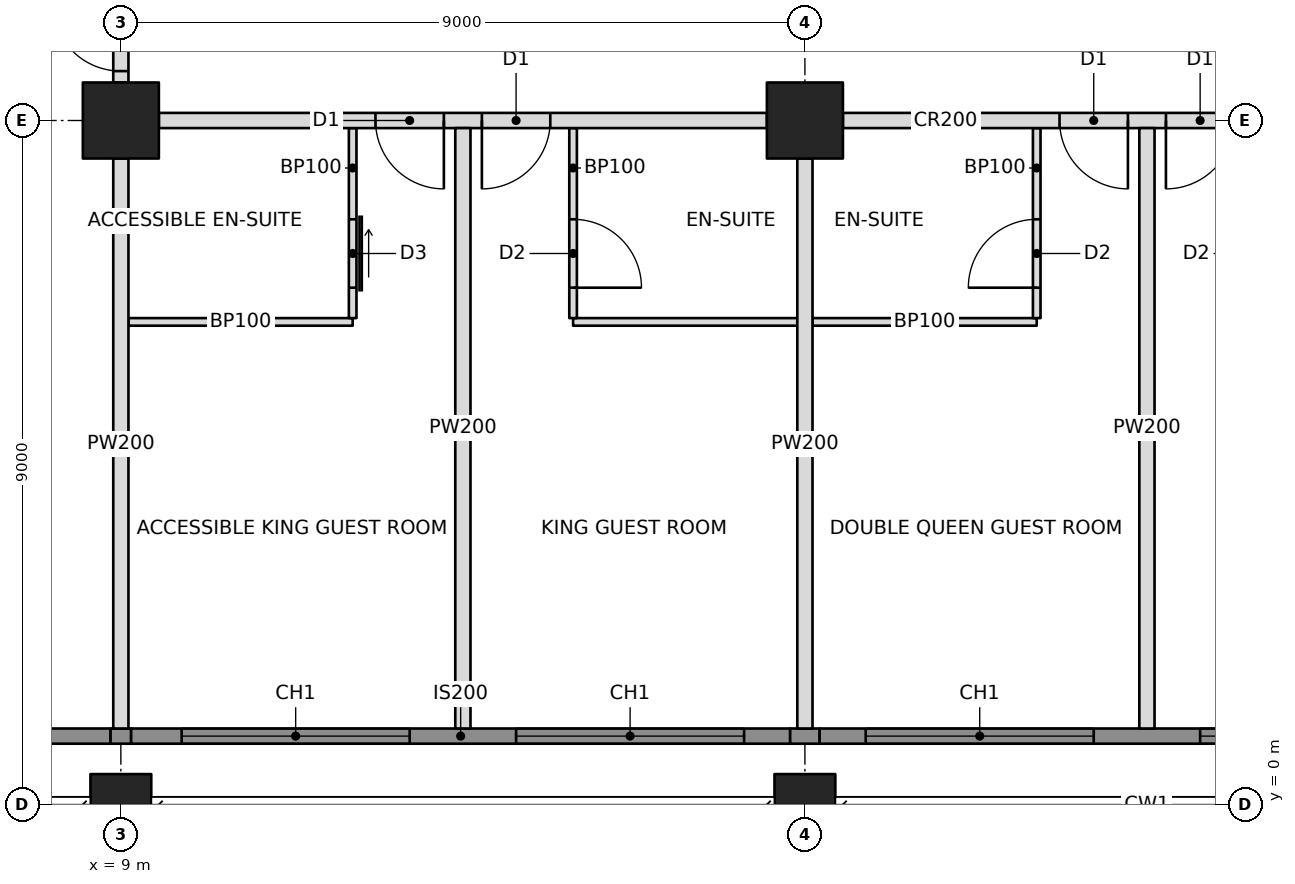
"""IFC4 building model, lengths in metres.
Left out: names, types, materials, properties, quantities, classifications, styles, units other than length and angle.
Written with IfcOpenShell. Run it as: python <this file> out.ifc"""

import sys

from ifc_helpers import new_model, si_unit, direction, frame, frame_2d, origin, origin_2d, place, context, subcontext, project, spatial, rectangle, hollow_rectangle, extrude, element, fill, save


model = new_model("IFC4")
c1 = context("Model", 3, precision=1e-05, world=origin(), true_north=direction((0.0, 1.0)))
c2 = subcontext(c1, "Body", "Model", "MODEL_VIEW")
j1 = project(units=[si_unit("LENGTHUNIT", "METRE"), si_unit("PLANEANGLEUNIT", "RADIAN")], contexts=[c1])
p1 = place(None, origin())
s1 = spatial("IfcSite", under=j1, at=p1, CompositionType="ELEMENT")
p2 = place(p1, origin())
s2 = spatial("IfcBuilding", under=s1, at=p2, CompositionType="ELEMENT")
p3 = place(p2, frame((0.0, 0.0, 163.8)))
s3 = spatial("IfcBuildingStorey", under=s2, at=p3, CompositionType="ELEMENT", Elevation=163.8)
p4 = place(p3, frame((9.0, 0.0, 0.0), z_axis=(0.0, 0.0, 1.0), x_axis=(1.0, 0.0, 0.0)))
e1 = element("IfcColumn", 1, at=p4, inside=s3, PredefinedType="COLUMN", context=c2, shape_type="SweptSolid", body=[
    extrude(hollow_rectangle(XDim=0.8, YDim=0.8, WallThickness=0.07, at=origin_2d()), origin(), (0.0, 0.0, 1.0), 3.4),
])
p5 = place(p3, frame((9.0, 9.0, 0.0), z_axis=(0.0, 0.0, 1.0), x_axis=(1.0, 0.0, 0.0)))
e2 = element("IfcColumn", 2, at=p5, inside=s3, PredefinedType="COLUMN", context=c2, shape_type="SweptSolid", body=[
    extrude(hollow_rectangle(XDim=1.0, YDim=1.0, WallThickness=0.1, at=origin_2d()), origin(), (0.0, 0.0, 1.0), 3.4),
])
p6 = place(p3, frame((18.0, 0.0, 0.0), z_axis=(0.0, 0.0, 1.0), x_axis=(1.0, 0.0, 0.0)))
e3 = element("IfcColumn", 3, at=p6, inside=s3, PredefinedType="COLUMN", context=c2, shape_type="SweptSolid", body=[
    extrude(hollow_rectangle(XDim=0.8, YDim=0.8, WallThickness=0.07, at=origin_2d()), origin(), (0.0, 0.0, 1.0), 3.4),
])
p7 = place(p3, frame((18.0, 9.0, 0.0), z_axis=(0.0, 0.0, 1.0), x_axis=(1.0, 0.0, 0.0)))
e4 = element("IfcColumn", 4, at=p7, inside=s3, PredefinedType="COLUMN", context=c2, shape_type="SweptSolid", body=[
    extrude(hollow_rectangle(XDim=1.0, YDim=1.0, WallThickness=0.1, at=origin_2d()), origin(), (0.0, 0.0, 1.0), 3.4),
])
p8 = place(p3, frame((3.0, 0.9, 0.0), z_axis=(0.0, 0.0, 1.0), x_axis=(1.0, 0.0, 0.0)))
e5 = element("IfcWall", 5, at=p8, inside=s3, PredefinedType="SOLIDWALL", context=c2, shape_type="SweptSolid", body=[
    extrude(rectangle(XDim=5.865, YDim=0.2, at=frame_2d((2.932, 0.0))), origin(), (0.0, 0.0, 1.0), 3.2),
])
p9 = place(p8, frame((1.45, 0.0, 0.6)))
e6 = element("IfcOpeningElement", 6, at=p9, cuts=e5, PredefinedType="OPENING", context=c2, shape_type="SweptSolid", body=[
    extrude(rectangle(XDim=3.0, YDim=2.2, at=frame_2d((1.5, 1.1))), frame((0.0, 0.11, 0.0), z_axis=(0.0, -1.0, 0.0), x_axis=(1.0, 0.0, 0.0)), (0.0, 0.0, 1.0), 0.22),
])
p10 = place(p3, frame((9.5, 9.0, 0.0), z_axis=(0.0, 0.0, 1.0), x_axis=(1.0, 0.0, 0.0)))
e7 = element("IfcWall", 7, at=p10, inside=s3, PredefinedType="PARTITIONING", context=c2, shape_type="SweptSolid", body=[
    extrude(rectangle(XDim=8.0, YDim=0.2, at=frame_2d((4.0, 0.0))), origin(), (0.0, 0.0, 1.0), 2.405),
])
p11 = place(p10, frame((2.85, 0.0, 0.0)))
e8 = element("IfcOpeningElement", 8, at=p11, cuts=e7, PredefinedType="OPENING", context=c2, shape_type="SweptSolid", body=[
    extrude(rectangle(XDim=0.9, YDim=2.1, at=frame_2d((0.45, 1.05))), frame((0.0, 0.11, 0.0), z_axis=(0.0, -1.0, 0.0), x_axis=(1.0, 0.0, 0.0)), (0.0, 0.0, 1.0), 0.22),
])
p12 = place(p10, frame((4.25, 0.0, 0.0)))
e9 = element("IfcOpeningElement", 9, at=p12, cuts=e7, PredefinedType="OPENING", context=c2, shape_type="SweptSolid", body=[
    extrude(rectangle(XDim=0.9, YDim=2.1, at=frame_2d((0.45, 1.05))), frame((0.0, 0.11, 0.0), z_axis=(0.0, -1.0, 0.0), x_axis=(1.0, 0.0, 0.0)), (0.0, 0.0, 1.0), 0.22),
])
p13 = place(p3, frame((18.5, 9.0, 0.0), z_axis=(0.0, 0.0, 1.0), x_axis=(1.0, 0.0, 0.0)))
e10 = element("IfcWall", 10, at=p13, inside=s3, PredefinedType="PARTITIONING", context=c2, shape_type="SweptSolid", body=[
    extrude(rectangle(XDim=8.0, YDim=0.2, at=frame_2d((4.0, 0.0))), origin(), (0.0, 0.0, 1.0), 2.405),
])
p14 = place(p13, frame((2.85, 0.0, 0.0)))
e11 = element("IfcOpeningElement", 11, at=p14, cuts=e10, PredefinedType="OPENING", context=c2, shape_type="SweptSolid", body=[
    extrude(rectangle(XDim=0.9, YDim=2.1, at=frame_2d((0.45, 1.05))), frame((0.0, 0.11, 0.0), z_axis=(0.0, -1.0, 0.0), x_axis=(1.0, 0.0, 0.0)), (0.0, 0.0, 1.0), 0.22),
])
p15 = place(p13, frame((4.25, 0.0, 0.0)))
e12 = element("IfcOpeningElement", 12, at=p15, cuts=e10, PredefinedType="OPENING", context=c2, shape_type="SweptSolid", body=[
    extrude(rectangle(XDim=0.9, YDim=2.1, at=frame_2d((0.45, 1.05))), frame((0.0, 0.11, 0.0), z_axis=(0.0, -1.0, 0.0), x_axis=(1.0, 0.0, 0.0)), (0.0, 0.0, 1.0), 0.22),
])
p16 = place(p3, frame((9.0, 8.5, 0.0), z_axis=(0.0, 0.0, 1.0), x_axis=(0.0, -1.0, 0.0)))
e13 = element("IfcWall", 13, at=p16, inside=s3, PredefinedType="PARTITIONING", context=c2, shape_type="SweptSolid", body=[
    extrude(rectangle(XDim=7.5, YDim=0.2, at=frame_2d((3.75, 0.0))), origin(), (0.0, 0.0, 1.0), 2.438),
])
p17 = place(p3, frame((13.5, 8.9, 0.0), z_axis=(0.0, 0.0, 1.0), x_axis=(0.0, -1.0, 0.0)))
e14 = element("IfcWall", 14, at=p17, inside=s3, PredefinedType="PARTITIONING", context=c2, shape_type="SweptSolid", body=[
    extrude(rectangle(XDim=7.9, YDim=0.2, at=frame_2d((3.95, 0.0))), origin(), (0.0, 0.0, 1.0), 2.404),
])
p18 = place(p3, frame((18.0, 8.5, 0.0), z_axis=(0.0, 0.0, 1.0), x_axis=(0.0, -1.0, 0.0)))
e15 = element("IfcWall", 15, at=p18, inside=s3, PredefinedType="PARTITIONING", context=c2, shape_type="SweptSolid", body=[
    extrude(rectangle(XDim=7.5, YDim=0.2, at=frame_2d((3.75, 0.0))), origin(), (0.0, 0.0, 1.0), 2.405),
])
p19 = place(p3, frame((22.5, 8.9, 0.0), z_axis=(0.0, 0.0, 1.0), x_axis=(0.0, -1.0, 0.0)))
e16 = element("IfcWall", 16, at=p19, inside=s3, PredefinedType="PARTITIONING", context=c2, shape_type="SweptSolid", body=[
    extrude(rectangle(XDim=7.9, YDim=0.2, at=frame_2d((3.95, 0.0))), origin(), (0.0, 0.0, 1.0), 2.404),
])
p20 = place(p3, frame((9.1, 6.35, 0.0), z_axis=(0.0, 0.0, 1.0), x_axis=(1.0, 0.0, 0.0)))
e17 = element("IfcWall", 17, at=p20, inside=s3, PredefinedType="PARTITIONING", context=c2, shape_type="SweptSolid", body=[
    extrude(rectangle(XDim=2.95, YDim=0.1, at=frame_2d((1.475, 0.0))), origin(), (0.0, 0.0, 1.0), 2.438),
])
p21 = place(p3, frame((12.05, 8.9, 0.0), z_axis=(0.0, 0.0, 1.0), x_axis=(0.0, -1.0, 0.0)))
e18 = element("IfcWall", 18, at=p21, inside=s3, PredefinedType="PARTITIONING", context=c2, shape_type="SweptSolid", body=[
    extrude(rectangle(XDim=2.5, YDim=0.1, at=frame_2d((1.25, 0.0))), origin(), (0.0, 0.0, 1.0), 2.404),
])
p22 = place(p21, frame((1.2, 0.0, 0.0)))
e19 = element("IfcOpeningElement", 19, at=p22, cuts=e18, PredefinedType="OPENING", context=c2, shape_type="SweptSolid", body=[
    extrude(rectangle(XDim=0.9, YDim=2.1, at=frame_2d((0.45, 1.05))), frame((0.0, 0.06, 0.0), z_axis=(0.0, -1.0, 0.0), x_axis=(1.0, 0.0, 0.0)), (0.0, 0.0, 1.0), 0.12),
])
p23 = place(p3, frame((14.95, 6.35, 0.0), z_axis=(0.0, 0.0, 1.0), x_axis=(1.0, 0.0, 0.0)))
e20 = element("IfcWall", 20, at=p23, inside=s3, PredefinedType="PARTITIONING", context=c2, shape_type="SweptSolid", body=[
    extrude(rectangle(XDim=2.95, YDim=0.1, at=frame_2d((1.475, 0.0))), origin(), (0.0, 0.0, 1.0), 2.404),
])
p24 = place(p3, frame((14.95, 8.9, 0.0), z_axis=(0.0, 0.0, 1.0), x_axis=(0.0, -1.0, 0.0)))
e21 = element("IfcWall", 21, at=p24, inside=s3, PredefinedType="PARTITIONING", context=c2, shape_type="SweptSolid", body=[
    extrude(rectangle(XDim=2.5, YDim=0.1, at=frame_2d((1.25, 0.0))), origin(), (0.0, 0.0, 1.0), 2.404),
])
p25 = place(p24, frame((1.2, 0.0, 0.0)))
e22 = element("IfcOpeningElement", 22, at=p25, cuts=e21, PredefinedType="OPENING", context=c2, shape_type="SweptSolid", body=[
    extrude(rectangle(XDim=0.9, YDim=2.1, at=frame_2d((0.45, 1.05))), frame((0.0, 0.06, 0.0), z_axis=(0.0, -1.0, 0.0), x_axis=(1.0, 0.0, 0.0)), (0.0, 0.0, 1.0), 0.12),
])
p26 = place(p3, frame((18.1, 6.35, 0.0), z_axis=(0.0, 0.0, 1.0), x_axis=(1.0, 0.0, 0.0)))
e23 = element("IfcWall", 23, at=p26, inside=s3, PredefinedType="PARTITIONING", context=c2, shape_type="SweptSolid", body=[
    extrude(rectangle(XDim=2.95, YDim=0.1, at=frame_2d((1.475, 0.0))), origin(), (0.0, 0.0, 1.0), 2.404),
])
p27 = place(p3, frame((21.05, 8.9, 0.0), z_axis=(0.0, 0.0, 1.0), x_axis=(0.0, -1.0, 0.0)))
e24 = element("IfcWall", 24, at=p27, inside=s3, PredefinedType="PARTITIONING", context=c2, shape_type="SweptSolid", body=[
    extrude(rectangle(XDim=2.5, YDim=0.1, at=frame_2d((1.25, 0.0))), origin(), (0.0, 0.0, 1.0), 2.404),
])
p28 = place(p27, frame((1.2, 0.0, 0.0)))
e25 = element("IfcOpeningElement", 25, at=p28, cuts=e24, PredefinedType="OPENING", context=c2, shape_type="SweptSolid", body=[
    extrude(rectangle(XDim=0.9, YDim=2.1, at=frame_2d((0.45, 1.05))), frame((0.0, 0.06, 0.0), z_axis=(0.0, -1.0, 0.0), x_axis=(1.0, 0.0, 0.0)), (0.0, 0.0, 1.0), 0.12),
])
p29 = place(p3, frame((9.0, 9.5, 0.0), z_axis=(0.0, 0.0, 1.0), x_axis=(0.0, 1.0, 0.0)))
e26 = element("IfcWall", 26, at=p29, inside=s3, PredefinedType="PARTITIONING", context=c2, shape_type="SweptSolid", body=[
    extrude(rectangle(XDim=1.2, YDim=0.2, at=frame_2d((0.6, 0.0))), origin(), (0.0, 0.0, 1.0), 2.405),
])
p30 = place(p29, frame((0.15, 0.0, 0.0)))
e27 = element("IfcOpeningElement", 27, at=p30, cuts=e26, PredefinedType="OPENING", context=c2, shape_type="SweptSolid", body=[
    extrude(rectangle(XDim=0.9, YDim=2.1, at=frame_2d((0.45, 1.05))), frame((0.0, 0.11, 0.0), z_axis=(0.0, -1.0, 0.0), x_axis=(1.0, 0.0, 0.0)), (0.0, 0.0, 1.0), 0.22),
])
p31 = place(p3, frame((8.865, 0.9, 0.0), z_axis=(0.0, 0.0, 1.0), x_axis=(1.0, 0.0, 0.0)))
e28 = element("IfcWall", 28, at=p31, inside=s3, PredefinedType="SOLIDWALL", context=c2, shape_type="SweptSolid", body=[
    extrude(rectangle(XDim=0.271, YDim=0.2, at=frame_2d((0.135, 0.0))), origin(), (0.0, 0.0, 1.0), 2.438),
])
p32 = place(p3, frame((9.135, 0.9, 0.0), z_axis=(0.0, 0.0, 1.0), x_axis=(1.0, 0.0, 0.0)))
e29 = element("IfcWall", 29, at=p32, inside=s3, PredefinedType="SOLIDWALL", context=c2, shape_type="SweptSolid", body=[
    extrude(rectangle(XDim=8.671, YDim=0.2, at=frame_2d((4.335, 0.0))), origin(), (0.0, 0.0, 1.0), 3.2),
])
p33 = place(p32, frame((0.665, 0.0, 0.6)))
e30 = element("IfcOpeningElement", 30, at=p33, cuts=e29, PredefinedType="OPENING", context=c2, shape_type="SweptSolid", body=[
    extrude(rectangle(XDim=3.0, YDim=2.2, at=frame_2d((1.5, 1.1))), frame((0.0, 0.11, 0.0), z_axis=(0.0, -1.0, 0.0), x_axis=(1.0, 0.0, 0.0)), (0.0, 0.0, 1.0), 0.22),
])
p34 = place(p32, frame((5.065, 0.0, 0.6)))
e31 = element("IfcOpeningElement", 31, at=p34, cuts=e29, PredefinedType="OPENING", context=c2, shape_type="SweptSolid", body=[
    extrude(rectangle(XDim=3.0, YDim=2.2, at=frame_2d((1.5, 1.1))), frame((0.0, 0.11, 0.0), z_axis=(0.0, -1.0, 0.0), x_axis=(1.0, 0.0, 0.0)), (0.0, 0.0, 1.0), 0.22),
])
p35 = place(p3, frame((17.806, 0.9, 0.0), z_axis=(0.0, 0.0, 1.0), x_axis=(1.0, 0.0, 0.0)))
e32 = element("IfcWall", 32, at=p35, inside=s3, PredefinedType="SOLIDWALL", context=c2, shape_type="SweptSolid", body=[
    extrude(rectangle(XDim=0.388, YDim=0.2, at=frame_2d((0.194, 0.0))), origin(), (0.0, 0.0, 1.0), 2.404),
])
p36 = place(p3, frame((18.194, 0.9, 0.0), z_axis=(0.0, 0.0, 1.0), x_axis=(1.0, 0.0, 0.0)))
e33 = element("IfcWall", 33, at=p36, inside=s3, PredefinedType="SOLIDWALL", context=c2, shape_type="SweptSolid", body=[
    extrude(rectangle(XDim=8.612, YDim=0.2, at=frame_2d((4.306, 0.0))), origin(), (0.0, 0.0, 1.0), 3.2),
])
p37 = place(p36, frame((0.606, 0.0, 0.6)))
e34 = element("IfcOpeningElement", 34, at=p37, cuts=e33, PredefinedType="OPENING", context=c2, shape_type="SweptSolid", body=[
    extrude(rectangle(XDim=3.0, YDim=2.2, at=frame_2d((1.5, 1.1))), frame((0.0, 0.11, 0.0), z_axis=(0.0, -1.0, 0.0), x_axis=(1.0, 0.0, 0.0)), (0.0, 0.0, 1.0), 0.22),
])
p38 = place(p36, frame((5.006, 0.0, 0.6)))
e35 = element("IfcOpeningElement", 35, at=p38, cuts=e33, PredefinedType="OPENING", context=c2, shape_type="SweptSolid", body=[
    extrude(rectangle(XDim=3.0, YDim=2.2, at=frame_2d((1.5, 1.1))), frame((0.0, 0.11, 0.0), z_axis=(0.0, -1.0, 0.0), x_axis=(1.0, 0.0, 0.0)), (0.0, 0.0, 1.0), 0.22),
])
p39 = place(p33, origin())
e36 = element("IfcWindow", 36, at=p39, inside=s3, PartitioningType="TRIPLE_PANEL_VERTICAL", PredefinedType="WINDOW", context=c2, shape_type="SweptSolid", body=[
    extrude(rectangle(XDim=3.0, YDim=2.2, at=frame_2d((1.5, 1.1))), frame((0.0, 0.03, 0.0), z_axis=(0.0, -1.0, 0.0), x_axis=(1.0, 0.0, 0.0)), (0.0, 0.0, 1.0), 0.06),
])
fill(e30, e36)
p40 = place(p34, origin())
e37 = element("IfcWindow", 37, at=p40, inside=s3, PartitioningType="TRIPLE_PANEL_VERTICAL", PredefinedType="WINDOW", context=c2, shape_type="SweptSolid", body=[
    extrude(rectangle(XDim=3.0, YDim=2.2, at=frame_2d((1.5, 1.1))), frame((0.0, 0.03, 0.0), z_axis=(0.0, -1.0, 0.0), x_axis=(1.0, 0.0, 0.0)), (0.0, 0.0, 1.0), 0.06),
])
fill(e31, e37)
p41 = place(p37, origin())
e38 = element("IfcWindow", 38, at=p41, inside=s3, PartitioningType="TRIPLE_PANEL_VERTICAL", PredefinedType="WINDOW", context=c2, shape_type="SweptSolid", body=[
    extrude(rectangle(XDim=3.0, YDim=2.2, at=frame_2d((1.5, 1.1))), frame((0.0, 0.03, 0.0), z_axis=(0.0, -1.0, 0.0), x_axis=(1.0, 0.0, 0.0)), (0.0, 0.0, 1.0), 0.06),
])
fill(e34, e38)
p42 = place(p38, origin())
e39 = element("IfcWindow", 39, at=p42, inside=s3, PartitioningType="TRIPLE_PANEL_VERTICAL", PredefinedType="WINDOW", context=c2, shape_type="SweptSolid", body=[
    extrude(rectangle(XDim=3.0, YDim=2.2, at=frame_2d((1.5, 1.1))), frame((0.0, 0.03, 0.0), z_axis=(0.0, -1.0, 0.0), x_axis=(1.0, 0.0, 0.0)), (0.0, 0.0, 1.0), 0.06),
])
fill(e35, e39)
p43 = place(p22, origin())
e40 = element("IfcDoor", 40, at=p43, inside=s3, OperationType="SLIDING_TO_LEFT", PredefinedType="DOOR", context=c2, shape_type="SweptSolid", body=[
    extrude(rectangle(XDim=0.9, YDim=2.1, at=frame_2d((0.45, 1.05))), frame((0.0, 0.025, 0.0), z_axis=(0.0, -1.0, 0.0), x_axis=(1.0, 0.0, 0.0)), (0.0, 0.0, 1.0), 0.05),
])
fill(e19, e40)
p44 = place(p11, frame((0.9, 0.0, 0.0), z_axis=(0.0, 0.0, 1.0), x_axis=(-1.0, 0.0, 0.0)))
e41 = element("IfcDoor", 41, at=p44, inside=s3, OperationType="SINGLE_SWING_LEFT", PredefinedType="DOOR", context=c2, shape_type="SweptSolid", body=[
    extrude(rectangle(XDim=0.9, YDim=2.1, at=frame_2d((0.45, 1.05))), frame((0.0, 0.025, 0.0), z_axis=(0.0, -1.0, 0.0), x_axis=(1.0, 0.0, 0.0)), (0.0, 0.0, 1.0), 0.05),
])
fill(e8, e41)
p45 = place(p25, origin())
e42 = element("IfcDoor", 42, at=p45, inside=s3, OperationType="SINGLE_SWING_RIGHT", PredefinedType="DOOR", context=c2, shape_type="SweptSolid", body=[
    extrude(rectangle(XDim=0.9, YDim=2.1, at=frame_2d((0.45, 1.05))), frame((0.0, 0.025, 0.0), z_axis=(0.0, -1.0, 0.0), x_axis=(1.0, 0.0, 0.0)), (0.0, 0.0, 1.0), 0.05),
])
fill(e22, e42)
p46 = place(p12, frame((0.9, 0.0, 0.0), z_axis=(0.0, 0.0, 1.0), x_axis=(-1.0, 0.0, 0.0)))
e43 = element("IfcDoor", 43, at=p46, inside=s3, OperationType="SINGLE_SWING_RIGHT", PredefinedType="DOOR", context=c2, shape_type="SweptSolid", body=[
    extrude(rectangle(XDim=0.9, YDim=2.1, at=frame_2d((0.45, 1.05))), frame((0.0, 0.025, 0.0), z_axis=(0.0, -1.0, 0.0), x_axis=(1.0, 0.0, 0.0)), (0.0, 0.0, 1.0), 0.05),
])
fill(e9, e43)
p47 = place(p28, frame((0.9, 0.0, 0.0), z_axis=(0.0, 0.0, 1.0), x_axis=(-1.0, 0.0, 0.0)))
e44 = element("IfcDoor", 44, at=p47, inside=s3, OperationType="SINGLE_SWING_LEFT", PredefinedType="DOOR", context=c2, shape_type="SweptSolid", body=[
    extrude(rectangle(XDim=0.9, YDim=2.1, at=frame_2d((0.45, 1.05))), frame((0.0, 0.025, 0.0), z_axis=(0.0, -1.0, 0.0), x_axis=(1.0, 0.0, 0.0)), (0.0, 0.0, 1.0), 0.05),
])
fill(e25, e44)
p48 = place(p14, frame((0.9, 0.0, 0.0), z_axis=(0.0, 0.0, 1.0), x_axis=(-1.0, 0.0, 0.0)))
e45 = element("IfcDoor", 45, at=p48, inside=s3, OperationType="SINGLE_SWING_LEFT", PredefinedType="DOOR", context=c2, shape_type="SweptSolid", body=[
    extrude(rectangle(XDim=0.9, YDim=2.1, at=frame_2d((0.45, 1.05))), frame((0.0, 0.025, 0.0), z_axis=(0.0, -1.0, 0.0), x_axis=(1.0, 0.0, 0.0)), (0.0, 0.0, 1.0), 0.05),
])
fill(e11, e45)
p49 = place(p15, frame((0.9, 0.0, 0.0), z_axis=(0.0, 0.0, 1.0), x_axis=(-1.0, 0.0, 0.0)))
e46 = element("IfcDoor", 46, at=p49, inside=s3, OperationType="SINGLE_SWING_RIGHT", PredefinedType="DOOR", context=c2, shape_type="SweptSolid", body=[
    extrude(rectangle(XDim=0.9, YDim=2.1, at=frame_2d((0.45, 1.05))), frame((0.0, 0.025, 0.0), z_axis=(0.0, -1.0, 0.0), x_axis=(1.0, 0.0, 0.0)), (0.0, 0.0, 1.0), 0.05),
])
fill(e12, e46)
p50 = place(p30, origin())
e47 = element("IfcDoor", 47, at=p50, inside=s3, OperationType="SINGLE_SWING_RIGHT", PredefinedType="DOOR", context=c2, shape_type="SweptSolid", body=[
    extrude(rectangle(XDim=0.9, YDim=2.1, at=frame_2d((0.45, 1.05))), frame((0.0, 0.025, 0.0), z_axis=(0.0, -1.0, 0.0), x_axis=(1.0, 0.0, 0.0)), (0.0, 0.0, 1.0), 0.05),
])
fill(e27, e47)
save(model, sys.argv[1])
